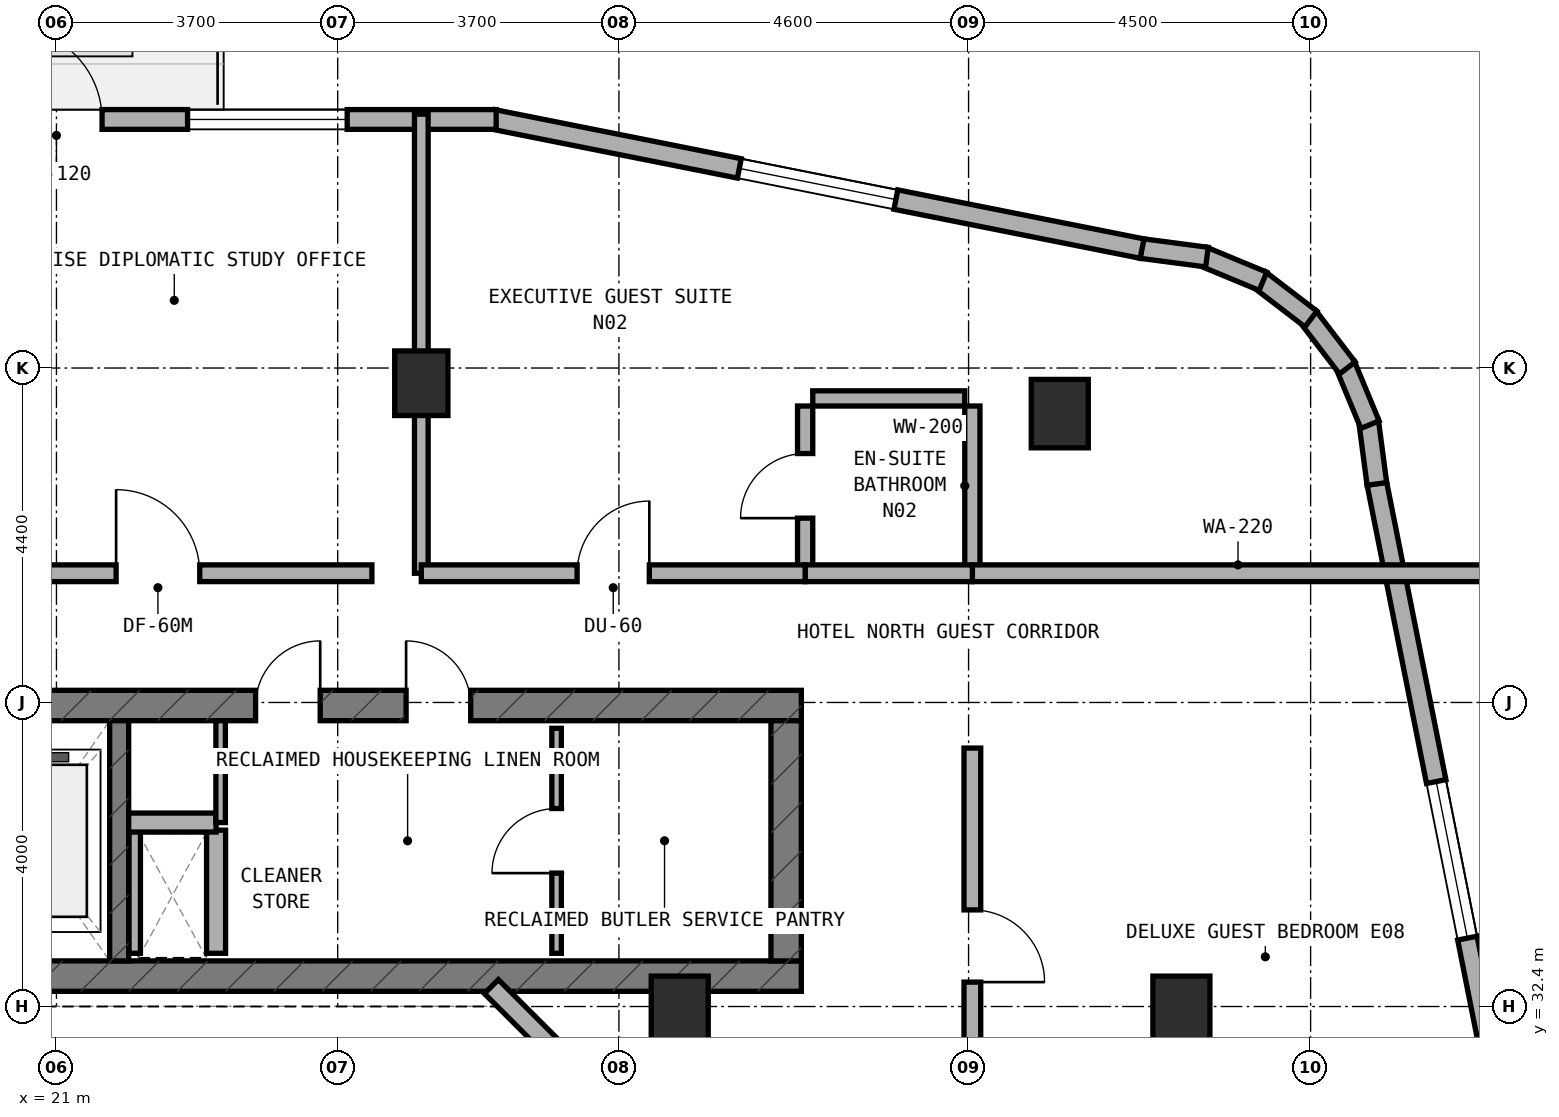
"""IFC4 building model, lengths in metres.
Left out: names, types, materials, properties, quantities, classifications, styles, units other than length and angle.
Written with IfcOpenShell. Run it as: python <this file> out.ifc"""

import sys

from ifc_helpers import new_model, si_unit, direction, frame, frame_2d, origin, origin_2d, place, context, subcontext, project, spatial, rectangle, extrude, element, fill, save


model = new_model("IFC4")
c1 = context("Model", 3, precision=1e-05, world=origin(), true_north=direction((0.0, 1.0)))
c2 = subcontext(c1, "Body", "Model", "MODEL_VIEW")
j1 = project(units=[si_unit("LENGTHUNIT", "METRE"), si_unit("PLANEANGLEUNIT", "RADIAN")], contexts=[c1])
p1 = place(None, origin())
s1 = spatial("IfcSite", under=j1, at=p1, CompositionType="ELEMENT")
p2 = place(p1, origin())
s2 = spatial("IfcBuilding", under=s1, at=p2, CompositionType="ELEMENT")
p3 = place(p2, frame((0.0, 0.0, 231.5)))
s3 = spatial("IfcBuildingStorey", under=s2, at=p3, CompositionType="ELEMENT", Elevation=231.5)
p4 = place(p3, frame((6.4, 32.8, 0.0), z_axis=(0.0, 0.0, 1.0), x_axis=(1.0, 0.0, 0.0)))
e1 = element("IfcWall", 1, at=p4, inside=s3, PredefinedType="SHEAR", context=c2, shape_type="SweptSolid", body=[
    extrude(rectangle(XDim=24.4, YDim=0.4, at=frame_2d((12.2, 0.0))), origin(), (0.0, 0.0, 1.0), 3.6),
])
p5 = place(p4, frame((6.05, 0.0, 0.0)))
e2 = element("IfcOpeningElement", 2, at=p5, cuts=e1, PredefinedType="OPENING", context=c2, shape_type="SweptSolid", body=[
    extrude(rectangle(XDim=1.1, YDim=2.15, at=frame_2d((0.55, 1.075))), frame((0.0, 0.21, 0.0), z_axis=(0.0, -1.0, 0.0), x_axis=(1.0, 0.0, 0.0)), (0.0, 0.0, 1.0), 0.42),
])
p6 = place(p3, frame((6.4, 36.36, 0.0), z_axis=(0.0, 0.0, 1.0), x_axis=(1.0, 0.0, 0.0)))
e3 = element("IfcWall", 3, at=p6, inside=s3, PredefinedType="SHEAR", context=c2, shape_type="SweptSolid", body=[
    extrude(rectangle(XDim=24.4, YDim=0.4, at=frame_2d((12.2, 0.0))), origin(), (0.0, 0.0, 1.0), 3.6),
])
p7 = place(p6, frame((9.15, 0.0, 0.0)))
e4 = element("IfcOpeningElement", 4, at=p7, cuts=e3, PredefinedType="OPENING", context=c2, shape_type="SweptSolid", body=[
    extrude(rectangle(XDim=1.2, YDim=2.15, at=frame_2d((0.6, 1.075))), frame((0.0, 0.21, 0.0), z_axis=(0.0, -1.0, 0.0), x_axis=(1.0, 0.0, 0.0)), (0.0, 0.0, 1.0), 0.42),
])
p8 = place(p6, frame((19.2, 0.0, 0.0)))
e5 = element("IfcOpeningElement", 5, at=p8, cuts=e3, PredefinedType="OPENING", context=c2, shape_type="SweptSolid", body=[
    extrude(rectangle(XDim=0.85, YDim=2.1, at=frame_2d((0.425, 1.05))), frame((0.0, 0.21, 0.0), z_axis=(0.0, -1.0, 0.0), x_axis=(1.0, 0.0, 0.0)), (0.0, 0.0, 1.0), 0.42),
])
p9 = place(p6, frame((17.22, 0.0, 0.0)))
e6 = element("IfcOpeningElement", 6, at=p9, cuts=e3, PredefinedType="OPENING", context=c2, shape_type="SweptSolid", body=[
    extrude(rectangle(XDim=0.85, YDim=2.1, at=frame_2d((0.425, 1.05))), frame((0.0, 0.21, 0.0), z_axis=(0.0, -1.0, 0.0), x_axis=(1.0, 0.0, 0.0)), (0.0, 0.0, 1.0), 0.42),
])
p10 = place(p3, frame((30.6, 33.0, 0.0), z_axis=(0.0, 0.0, 1.0), x_axis=(0.0, 1.0, 0.0)))
e7 = element("IfcWall", 7, at=p10, inside=s3, PredefinedType="SHEAR", context=c2, shape_type="SweptSolid", body=[
    extrude(rectangle(XDim=3.16, YDim=0.4, at=frame_2d((1.58, 0.0))), origin(), (0.0, 0.0, 1.0), 3.6),
])
p11 = place(p3, frame((21.825, 33.0, 0.0), z_axis=(0.0, 0.0, 1.0), x_axis=(0.0, 1.0, 0.0)))
e8 = element("IfcWall", 8, at=p11, inside=s3, PredefinedType="STANDARD", context=c2, shape_type="SweptSolid", body=[
    extrude(rectangle(XDim=3.16, YDim=0.25, at=frame_2d((1.58, 0.0))), origin(), (0.0, 0.0, 1.0), 3.32),
])
p12 = place(p3, frame((25.8, 40.6, 0.0), z_axis=(0.0, 0.0, 1.0), x_axis=(1.0, 0.0, 0.0)))
e9 = element("IfcColumn", 9, at=p12, inside=s3, PredefinedType="COLUMN", context=c2, shape_type="SweptSolid", body=[
    extrude(rectangle(XDim=0.7, YDim=0.85, at=origin_2d()), origin(), (0.0, 0.0, 1.0), 3.6),
])
for number, where, z_axis, x_axis in (
    (10, (34.2, 40.2, 0.0), (0.0, 0.0, 1.0), (1.0, 0.0, 0.0)),
    (11, (35.8, 32.35, 0.0), (0.0, 0.0, 1.0), (1.0, 0.0, 0.0)),
    (12, (29.2, 32.35, 0.0), (0.0, 0.0, 1.0), (1.0, 0.0, 0.0)),
):
    element("IfcColumn", number, at=place(p3, frame(where, z_axis=z_axis, x_axis=x_axis)), inside=s3, PredefinedType="COLUMN", context=c2, shape_type="SweptSolid", body=[
        extrude(rectangle(XDim=0.75, YDim=0.9, at=origin_2d()), origin(), (0.0, 0.0, 1.0), 3.6),
    ])
p13 = place(p3, frame((40.084, 30.681, 0.0), z_axis=(0.0, 0.0, 1.0), x_axis=(-0.195291715883, 0.980745199176, 0.0)))
e13 = element("IfcWall", 13, at=p13, inside=s3, PredefinedType="STANDARD", context=c2, shape_type="SweptSolid", body=[
    extrude(rectangle(XDim=8.771, YDim=0.26, at=frame_2d((4.385, 0.0))), origin(), (0.0, 0.0, 1.0), 3.32),
])
p14 = place(p13, frame((2.67, 0.0, 0.85)))
e14 = element("IfcOpeningElement", 14, at=p14, cuts=e13, PredefinedType="OPENING", context=c2, shape_type="SweptSolid", body=[
    extrude(rectangle(XDim=2.1, YDim=1.5, at=frame_2d((1.05, 0.75))), frame((0.0, 0.14, 0.0), z_axis=(0.0, -1.0, 0.0), x_axis=(1.0, 0.0, 0.0)), (0.0, 0.0, 1.0), 0.28),
])
p15 = place(p3, frame((38.372, 39.275, 0.0), z_axis=(0.0, 0.0, 1.0), x_axis=(-0.130954667764, 0.9913883573, 0.0)))
e15 = element("IfcWall", 15, at=p15, inside=s3, PredefinedType="STANDARD", context=c2, shape_type="SweptSolid", body=[
    extrude(rectangle(XDim=0.833, YDim=0.26, at=frame_2d((0.417, 0.0))), origin(), (0.0, 0.0, 1.0), 3.32),
])
p16 = place(p3, frame((38.281, 40.055, 0.0), z_axis=(0.0, 0.0, 1.0), x_axis=(-0.382985169477, 0.923754491172, 0.0)))
e16 = element("IfcWall", 16, at=p16, inside=s3, PredefinedType="STANDARD", context=c2, shape_type="SweptSolid", body=[
    extrude(rectangle(XDim=0.851, YDim=0.26, at=frame_2d((0.426, 0.0))), origin(), (0.0, 0.0, 1.0), 3.32),
])
for number, where, z_axis, x_axis in (
    (17, (37.983, 40.801, 0.0), (0.0, 0.0, 1.0), (-0.608, 0.794, 0.0)),
    (18, (37.504, 41.445, 0.0), (0.0, 0.0, 1.0), (-0.794, 0.608, 0.0)),
):
    element("IfcWall", number, at=place(p3, frame(where, z_axis=z_axis, x_axis=x_axis)), inside=s3, PredefinedType="STANDARD", context=c2, shape_type="SweptSolid", body=[
        extrude(rectangle(XDim=0.85, YDim=0.26, at=frame_2d((0.425, 0.0))), origin(), (0.0, 0.0, 1.0), 3.32),
    ])
p17 = place(p3, frame((36.873, 41.941, 0.0), z_axis=(0.0, 0.0, 1.0), x_axis=(-0.923652976167, 0.383229930484, 0.0)))
e19 = element("IfcWall", 19, at=p17, inside=s3, PredefinedType="STANDARD", context=c2, shape_type="SweptSolid", body=[
    extrude(rectangle(XDim=0.851, YDim=0.26, at=frame_2d((0.426, 0.0))), origin(), (0.0, 0.0, 1.0), 3.32),
])
p18 = place(p3, frame((36.136, 42.259, 0.0), z_axis=(0.0, 0.0, 1.0), x_axis=(-0.991493480548, 0.130156359936, 0.0)))
e20 = element("IfcWall", 20, at=p18, inside=s3, PredefinedType="STANDARD", context=c2, shape_type="SweptSolid", body=[
    extrude(rectangle(XDim=0.868, YDim=0.26, at=frame_2d((0.434, 0.0))), origin(), (0.0, 0.0, 1.0), 3.32),
])
p19 = place(p3, frame((35.283, 42.371, 0.0), z_axis=(0.0, 0.0, 1.0), x_axis=(-0.980748582507, 0.1952747242, 0.0)))
e21 = element("IfcWall", 21, at=p19, inside=s3, PredefinedType="STANDARD", context=c2, shape_type="SweptSolid", body=[
    extrude(rectangle(XDim=8.705, YDim=0.26, at=frame_2d((4.353, 0.0))), origin(), (0.0, 0.0, 1.0), 3.32),
])
p20 = place(p19, frame((3.303, 0.0, 0.85)))
e22 = element("IfcOpeningElement", 22, at=p20, cuts=e21, PredefinedType="OPENING", context=c2, shape_type="SweptSolid", body=[
    extrude(rectangle(XDim=2.1, YDim=1.5, at=frame_2d((1.05, 0.75))), frame((0.0, 0.14, 0.0), z_axis=(0.0, -1.0, 0.0), x_axis=(1.0, 0.0, 0.0)), (0.0, 0.0, 1.0), 0.28),
])
p21 = place(p3, frame((26.785, 44.07, 0.0), z_axis=(0.0, 0.0, 1.0), x_axis=(-1.0, 0.0, 0.0)))
e23 = element("IfcWall", 23, at=p21, inside=s3, PredefinedType="STANDARD", context=c2, shape_type="SweptSolid", body=[
    extrude(rectangle(XDim=11.535, YDim=0.26, at=frame_2d((5.768, 0.0))), origin(), (0.0, 0.0, 1.0), 3.32),
])
p22 = place(p21, frame((5.185, 0.0, 0.0)))
e24 = element("IfcOpeningElement", 24, at=p22, cuts=e23, PredefinedType="OPENING", context=c2, shape_type="SweptSolid", body=[
    extrude(rectangle(XDim=1.2, YDim=2.15, at=frame_2d((0.6, 1.075))), frame((0.0, 0.14, 0.0), z_axis=(0.0, -1.0, 0.0), x_axis=(1.0, 0.0, 0.0)), (0.0, 0.0, 1.0), 0.28),
])
p23 = place(p21, frame((1.96, 0.0, 0.85)))
e25 = element("IfcOpeningElement", 25, at=p23, cuts=e23, PredefinedType="OPENING", context=c2, shape_type="SweptSolid", body=[
    extrude(rectangle(XDim=2.1, YDim=1.5, at=frame_2d((1.05, 0.75))), frame((0.0, 0.14, 0.0), z_axis=(0.0, -1.0, 0.0), x_axis=(1.0, 0.0, 0.0)), (0.0, 0.0, 1.0), 0.28),
])
p24 = place(p21, frame((7.885, 0.0, 0.85)))
e26 = element("IfcOpeningElement", 26, at=p24, cuts=e23, PredefinedType="OPENING", context=c2, shape_type="SweptSolid", body=[
    extrude(rectangle(XDim=2.1, YDim=1.5, at=frame_2d((1.05, 0.75))), frame((0.0, 0.14, 0.0), z_axis=(0.0, -1.0, 0.0), x_axis=(1.0, 0.0, 0.0)), (0.0, 0.0, 1.0), 0.28),
])
p25 = place(p3, frame((28.556, 30.828, 0.0), z_axis=(0.0, 0.0, 1.0), x_axis=(-0.707059717605, 0.707153841636, 0.0)))
e27 = element("IfcWall", 27, at=p25, inside=s3, PredefinedType="STANDARD", context=c2, shape_type="SweptSolid", body=[
    extrude(rectangle(XDim=2.594, YDim=0.26, at=frame_2d((1.297, 0.0))), origin(), (0.0, 0.0, 1.0), 3.32),
])
p26 = place(p3, frame((27.58, 33.1, 0.0), z_axis=(0.0, 0.0, 1.0), x_axis=(0.0, 1.0, 0.0)))
e28 = element("IfcWall", 28, at=p26, inside=s3, PredefinedType="PARTITIONING", context=c2, shape_type="SweptSolid", body=[
    extrude(rectangle(XDim=2.96, YDim=0.125, at=frame_2d((1.48, 0.0))), origin(), (0.0, 0.0, 1.0), 3.32),
])
p27 = place(p26, frame((1.055, 0.0, 0.0)))
e29 = element("IfcOpeningElement", 29, at=p27, cuts=e28, PredefinedType="OPENING", context=c2, shape_type="SweptSolid", body=[
    extrude(rectangle(XDim=0.85, YDim=2.1, at=frame_2d((0.425, 1.05))), frame((0.0, 0.073, 0.0), z_axis=(0.0, -1.0, 0.0), x_axis=(1.0, 0.0, 0.0)), (0.0, 0.0, 1.0), 0.145),
])
p28 = place(p3, frame((22.03, 33.1, 0.0), z_axis=(0.0, 0.0, 1.0), x_axis=(0.0, 1.0, 0.0)))
e30 = element("IfcWall", 30, at=p28, inside=s3, PredefinedType="PARTITIONING", context=c2, shape_type="SweptSolid", body=[
    extrude(rectangle(XDim=1.62, YDim=0.15, at=frame_2d((0.81, 0.0))), origin(), (0.0, 0.0, 1.0), 3.32),
])
p29 = place(p3, frame((23.1, 33.1, 0.0), z_axis=(0.0, 0.0, 1.0), x_axis=(0.0, 1.0, 0.0)))
e31 = element("IfcWall", 31, at=p29, inside=s3, PredefinedType="SOLIDWALL", context=c2, shape_type="SweptSolid", body=[
    extrude(rectangle(XDim=1.62, YDim=0.25, at=frame_2d((0.81, 0.0))), origin(), (0.0, 0.0, 1.0), 3.32),
])
p30 = place(p3, frame((21.95, 34.82, 0.0), z_axis=(0.0, 0.0, 1.0), x_axis=(1.0, 0.0, 0.0)))
e32 = element("IfcWall", 32, at=p30, inside=s3, PredefinedType="SOLIDWALL", context=c2, shape_type="SweptSolid", body=[
    extrude(rectangle(XDim=1.15, YDim=0.25, at=frame_2d((0.575, 0.0))), origin(), (0.0, 0.0, 1.0), 3.32),
])
p31 = place(p3, frame((23.16, 34.82, 0.0), z_axis=(0.0, 0.0, 1.0), x_axis=(0.0, 1.0, 0.0)))
e33 = element("IfcWall", 33, at=p31, inside=s3, PredefinedType="PARTITIONING", context=c2, shape_type="SweptSolid", body=[
    extrude(rectangle(XDim=1.34, YDim=0.125, at=frame_2d((0.67, 0.0))), origin(), (0.0, 0.0, 1.0), 3.32),
])
p32 = place(p3, frame((19.95, 38.1, 0.0), z_axis=(0.0, 0.0, 1.0), x_axis=(1.0, 0.0, 0.0)))
e34 = element("IfcWall", 34, at=p32, inside=s3, PredefinedType="SOLIDWALL", context=c2, shape_type="SweptSolid", body=[
    extrude(rectangle(XDim=5.2, YDim=0.22, at=frame_2d((2.6, 0.0))), origin(), (0.0, 0.0, 1.0), 3.32),
])
p33 = place(p32, frame((1.835, 0.0, 0.0)))
e35 = element("IfcOpeningElement", 35, at=p33, cuts=e34, PredefinedType="OPENING", context=c2, shape_type="SweptSolid", body=[
    extrude(rectangle(XDim=1.1, YDim=2.1, at=frame_2d((0.55, 1.05))), frame((0.0, 0.12, 0.0), z_axis=(0.0, -1.0, 0.0), x_axis=(1.0, 0.0, 0.0)), (0.0, 0.0, 1.0), 0.24),
])
p34 = place(p3, frame((25.8, 38.1, 0.0), z_axis=(0.0, 0.0, 1.0), x_axis=(0.0, 1.0, 0.0)))
e36 = element("IfcWall", 36, at=p34, inside=s3, PredefinedType="SOLIDWALL", context=c2, shape_type="SweptSolid", body=[
    extrude(rectangle(XDim=6.04, YDim=0.18, at=frame_2d((3.02, 0.0))), origin(), (0.0, 0.0, 1.0), 2.745),
])
p35 = place(p3, frame((30.85, 38.2, 0.0), z_axis=(0.0, 0.0, 1.0), x_axis=(0.0, 1.0, 0.0)))
e37 = element("IfcWall", 37, at=p35, inside=s3, PredefinedType="PLUMBINGWALL", context=c2, shape_type="SweptSolid", body=[
    extrude(rectangle(XDim=2.1, YDim=0.2, at=frame_2d((1.05, 0.0))), origin(), (0.0, 0.0, 1.0), 2.895),
])
p36 = place(p35, frame((0.625, 0.0, 0.0)))
e38 = element("IfcOpeningElement", 38, at=p36, cuts=e37, PredefinedType="OPENING", context=c2, shape_type="SweptSolid", body=[
    extrude(rectangle(XDim=0.85, YDim=2.1, at=frame_2d((0.425, 1.05))), frame((0.0, 0.11, 0.0), z_axis=(0.0, -1.0, 0.0), x_axis=(1.0, 0.0, 0.0)), (0.0, 0.0, 1.0), 0.22),
])
p37 = place(p3, frame((30.95, 40.4, 0.0), z_axis=(0.0, 0.0, 1.0), x_axis=(1.0, 0.0, 0.0)))
e39 = element("IfcWall", 39, at=p37, inside=s3, PredefinedType="PLUMBINGWALL", context=c2, shape_type="SweptSolid", body=[
    extrude(rectangle(XDim=2.0, YDim=0.2, at=frame_2d((1.0, 0.0))), origin(), (0.0, 0.0, 1.0), 3.015),
])
p38 = place(p3, frame((33.05, 38.2, 0.0), z_axis=(0.0, 0.0, 1.0), x_axis=(0.0, 1.0, 0.0)))
e40 = element("IfcWall", 40, at=p38, inside=s3, PredefinedType="PLUMBINGWALL", context=c2, shape_type="SweptSolid", body=[
    extrude(rectangle(XDim=2.1, YDim=0.2, at=frame_2d((1.05, 0.0))), origin(), (0.0, 0.0, 1.0), 2.895),
])
p39 = place(p3, frame((33.05, 38.1, 0.0), z_axis=(0.0, 0.0, 1.0), x_axis=(1.0, 0.0, 0.0)))
e41 = element("IfcWall", 41, at=p39, inside=s3, PredefinedType="SOLIDWALL", context=c2, shape_type="SweptSolid", body=[
    extrude(rectangle(XDim=6.99, YDim=0.22, at=frame_2d((3.495, 0.0))), origin(), (0.0, 0.0, 1.0), 2.745),
])
p40 = place(p3, frame((30.85, 38.1, 0.0), z_axis=(0.0, 0.0, 1.0), x_axis=(1.0, 0.0, 0.0)))
e42 = element("IfcWall", 42, at=p40, inside=s3, PredefinedType="SOLIDWALL", context=c2, shape_type="SweptSolid", body=[
    extrude(rectangle(XDim=2.2, YDim=0.22, at=frame_2d((1.1, 0.0))), origin(), (0.0, 0.0, 1.0), 3.32),
])
p41 = place(p3, frame((25.8, 38.1, 0.0), z_axis=(0.0, 0.0, 1.0), x_axis=(1.0, 0.0, 0.0)))
e43 = element("IfcWall", 43, at=p41, inside=s3, PredefinedType="SOLIDWALL", context=c2, shape_type="SweptSolid", body=[
    extrude(rectangle(XDim=5.05, YDim=0.22, at=frame_2d((2.525, 0.0))), origin(), (0.0, 0.0, 1.0), 2.745),
])
p42 = place(p41, frame((2.05, 0.0, 0.0)))
e44 = element("IfcOpeningElement", 44, at=p42, cuts=e43, PredefinedType="OPENING", context=c2, shape_type="SweptSolid", body=[
    extrude(rectangle(XDim=0.95, YDim=2.1, at=frame_2d((0.475, 1.05))), frame((0.0, 0.12, 0.0), z_axis=(0.0, -1.0, 0.0), x_axis=(1.0, 0.0, 0.0)), (0.0, 0.0, 1.0), 0.24),
])
p43 = place(p3, frame((33.05, 30.593, 0.0), z_axis=(0.0, 0.0, 1.0), x_axis=(0.0, 1.0, 0.0)))
e45 = element("IfcWall", 45, at=p43, inside=s3, PredefinedType="SOLIDWALL", context=c2, shape_type="SweptSolid", body=[
    extrude(rectangle(XDim=5.207, YDim=0.22, at=frame_2d((2.604, 0.0))), origin(), (0.0, 0.0, 1.0), 2.745),
])
p44 = place(p43, frame((2.128, 0.0, 0.0)))
e46 = element("IfcOpeningElement", 46, at=p44, cuts=e45, PredefinedType="OPENING", context=c2, shape_type="SweptSolid", body=[
    extrude(rectangle(XDim=0.95, YDim=2.1, at=frame_2d((0.475, 1.05))), frame((0.0, 0.12, 0.0), z_axis=(0.0, -1.0, 0.0), x_axis=(1.0, 0.0, 0.0)), (0.0, 0.0, 1.0), 0.24),
])
p45 = place(p14, origin())
e47 = element("IfcWindow", 47, at=p45, inside=s3, PartitioningType="SINGLE_PANEL", PredefinedType="WINDOW", context=c2, shape_type="SweptSolid", body=[
    extrude(rectangle(XDim=2.1, YDim=1.5, at=frame_2d((1.05, 0.75))), frame((0.0, 0.03, 0.0), z_axis=(0.0, -1.0, 0.0), x_axis=(1.0, 0.0, 0.0)), (0.0, 0.0, 1.0), 0.06),
])
fill(e14, e47)
p46 = place(p20, origin())
e48 = element("IfcWindow", 48, at=p46, inside=s3, PartitioningType="SINGLE_PANEL", PredefinedType="WINDOW", context=c2, shape_type="SweptSolid", body=[
    extrude(rectangle(XDim=2.1, YDim=1.5, at=frame_2d((1.05, 0.75))), frame((0.0, 0.03, 0.0), z_axis=(0.0, -1.0, 0.0), x_axis=(1.0, 0.0, 0.0)), (0.0, 0.0, 1.0), 0.06),
])
fill(e22, e48)
p47 = place(p22, frame((1.2, 0.0, 0.0), z_axis=(0.0, 0.0, 1.0), x_axis=(-1.0, 0.0, 0.0)))
e49 = element("IfcDoor", 49, at=p47, inside=s3, OperationType="SINGLE_SWING_LEFT", PredefinedType="DOOR", context=c2, shape_type="SweptSolid", body=[
    extrude(rectangle(XDim=1.2, YDim=2.15, at=frame_2d((0.6, 1.075))), frame((0.0, 0.025, 0.0), z_axis=(0.0, -1.0, 0.0), x_axis=(1.0, 0.0, 0.0)), (0.0, 0.0, 1.0), 0.05),
])
fill(e24, e49)
p48 = place(p23, origin())
e50 = element("IfcWindow", 50, at=p48, inside=s3, PartitioningType="SINGLE_PANEL", PredefinedType="WINDOW", context=c2, shape_type="SweptSolid", body=[
    extrude(rectangle(XDim=2.1, YDim=1.5, at=frame_2d((1.05, 0.75))), frame((0.0, 0.03, 0.0), z_axis=(0.0, -1.0, 0.0), x_axis=(1.0, 0.0, 0.0)), (0.0, 0.0, 1.0), 0.06),
])
fill(e25, e50)
p49 = place(p8, origin())
e51 = element("IfcDoor", 51, at=p49, inside=s3, OperationType="SINGLE_SWING_LEFT", PredefinedType="DOOR", context=c2, shape_type="SweptSolid", body=[
    extrude(rectangle(XDim=0.85, YDim=2.1, at=frame_2d((0.425, 1.05))), frame((0.0, 0.025, 0.0), z_axis=(0.0, -1.0, 0.0), x_axis=(1.0, 0.0, 0.0)), (0.0, 0.0, 1.0), 0.05),
])
fill(e5, e51)
p50 = place(p9, origin())
e52 = element("IfcDoor", 52, at=p50, inside=s3, OperationType="SINGLE_SWING_RIGHT", PredefinedType="DOOR", context=c2, shape_type="SweptSolid", body=[
    extrude(rectangle(XDim=0.85, YDim=2.1, at=frame_2d((0.425, 1.05))), frame((0.0, 0.025, 0.0), z_axis=(0.0, -1.0, 0.0), x_axis=(1.0, 0.0, 0.0)), (0.0, 0.0, 1.0), 0.05),
])
fill(e6, e52)
p51 = place(p27, origin())
e53 = element("IfcDoor", 53, at=p51, inside=s3, OperationType="SINGLE_SWING_LEFT", PredefinedType="DOOR", context=c2, shape_type="SweptSolid", body=[
    extrude(rectangle(XDim=0.85, YDim=2.1, at=frame_2d((0.425, 1.05))), frame((0.0, 0.025, 0.0), z_axis=(0.0, -1.0, 0.0), x_axis=(1.0, 0.0, 0.0)), (0.0, 0.0, 1.0), 0.05),
])
fill(e29, e53)
p52 = place(p33, origin())
e54 = element("IfcDoor", 54, at=p52, inside=s3, OperationType="SINGLE_SWING_LEFT", PredefinedType="DOOR", context=c2, shape_type="SweptSolid", body=[
    extrude(rectangle(XDim=1.1, YDim=2.1, at=frame_2d((0.55, 1.05))), frame((0.0, 0.025, 0.0), z_axis=(0.0, -1.0, 0.0), x_axis=(1.0, 0.0, 0.0)), (0.0, 0.0, 1.0), 0.05),
])
fill(e35, e54)
p53 = place(p36, origin())
e55 = element("IfcDoor", 55, at=p53, inside=s3, OperationType="SINGLE_SWING_LEFT", PredefinedType="DOOR", context=c2, shape_type="SweptSolid", body=[
    extrude(rectangle(XDim=0.85, YDim=2.1, at=frame_2d((0.425, 1.05))), frame((0.0, 0.025, 0.0), z_axis=(0.0, -1.0, 0.0), x_axis=(1.0, 0.0, 0.0)), (0.0, 0.0, 1.0), 0.05),
])
fill(e38, e55)
p54 = place(p42, origin())
e56 = element("IfcDoor", 56, at=p54, inside=s3, OperationType="SINGLE_SWING_RIGHT", PredefinedType="DOOR", context=c2, shape_type="SweptSolid", body=[
    extrude(rectangle(XDim=0.95, YDim=2.1, at=frame_2d((0.475, 1.05))), frame((0.0, 0.025, 0.0), z_axis=(0.0, -1.0, 0.0), x_axis=(1.0, 0.0, 0.0)), (0.0, 0.0, 1.0), 0.05),
])
fill(e44, e56)
p55 = place(p44, frame((0.95, 0.0, 0.0), z_axis=(0.0, 0.0, 1.0), x_axis=(-1.0, 0.0, 0.0)))
e57 = element("IfcDoor", 57, at=p55, inside=s3, OperationType="SINGLE_SWING_RIGHT", PredefinedType="DOOR", context=c2, shape_type="SweptSolid", body=[
    extrude(rectangle(XDim=0.95, YDim=2.1, at=frame_2d((0.475, 1.05))), frame((0.0, 0.025, 0.0), z_axis=(0.0, -1.0, 0.0), x_axis=(1.0, 0.0, 0.0)), (0.0, 0.0, 1.0), 0.05),
])
fill(e46, e57)
save(model, sys.argv[1])
